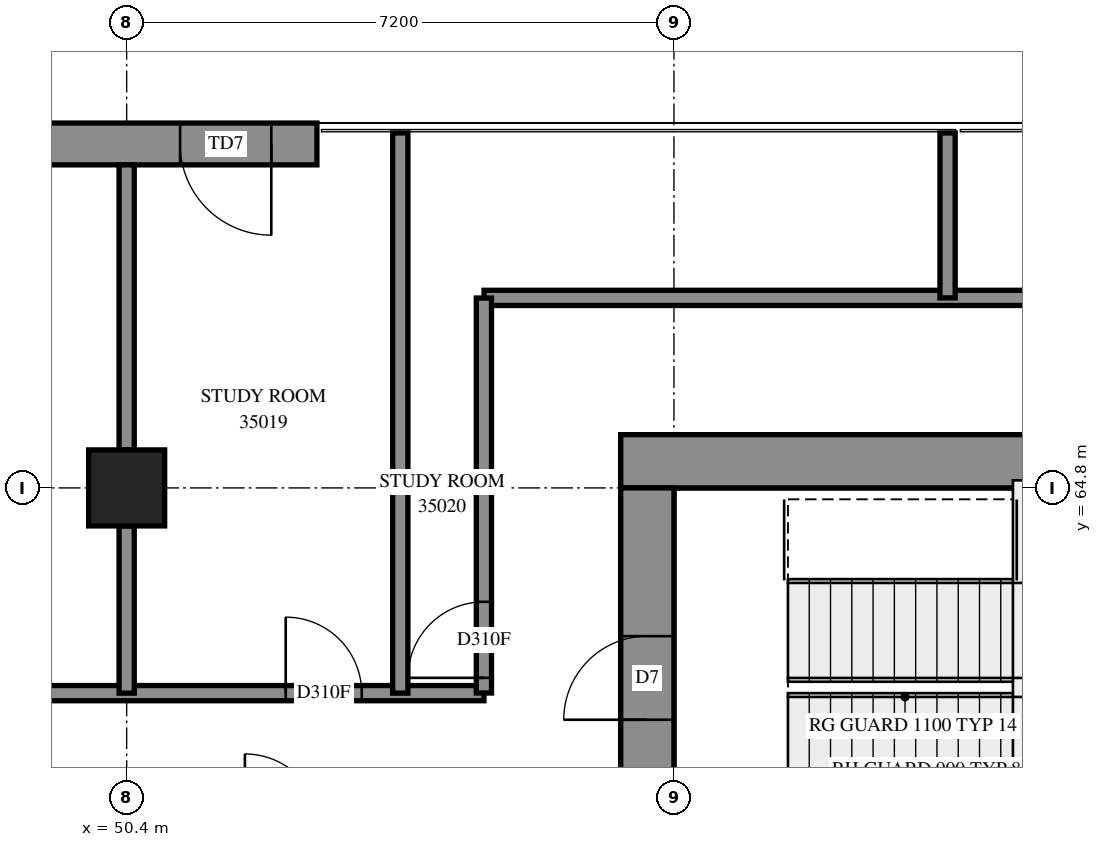
"""IFC4 building model, lengths in metres.
Left out: names, types, materials, properties, quantities, classifications, styles, units other than length and angle.
Written with IfcOpenShell. Run it as: python <this file> out.ifc"""

import sys

from ifc_helpers import new_model, si_unit, direction, frame, frame_2d, origin, origin_2d, place, context, subcontext, project, spatial, rectangle, extrude, element, fill, save


model = new_model("IFC4")
c1 = context("Model", 3, precision=1e-05, world=origin(), true_north=direction((0.0, 1.0)))
c2 = subcontext(c1, "Body", "Model", "MODEL_VIEW")
j1 = project(units=[si_unit("LENGTHUNIT", "METRE"), si_unit("PLANEANGLEUNIT", "RADIAN")], contexts=[c1])
p1 = place(None, origin())
s1 = spatial("IfcSite", under=j1, at=p1, CompositionType="ELEMENT")
p2 = place(p1, origin())
s2 = spatial("IfcBuilding", under=s1, at=p2, CompositionType="ELEMENT")
p3 = place(p2, frame((0.0, 0.0, 131.2)))
s3 = spatial("IfcBuildingStorey", under=s2, at=p3, CompositionType="ELEMENT", Elevation=131.2)
p4 = place(p3, frame((50.4, 64.8, 0.0), z_axis=(0.0, 0.0, 1.0), x_axis=(1.0, 0.0, 0.0)))
e1 = element("IfcColumn", 1, at=p4, inside=s3, PredefinedType="COLUMN", context=c2, shape_type="SweptSolid", body=[
    extrude(rectangle(XDim=1.0, YDim=1.0, at=origin_2d()), origin(), (0.0, 0.0, 1.0), 3.9),
])
p5 = place(p3, frame((56.9, 65.15, -0.3), z_axis=(0.0, 0.0, 1.0), x_axis=(1.0, 0.0, 0.0)))
e2 = element("IfcWall", 2, at=p5, inside=s3, PredefinedType="SHEAR", context=c2, shape_type="SweptSolid", body=[
    extrude(rectangle(XDim=15.8, YDim=0.7, at=frame_2d((7.9, 0.0))), origin(), (0.0, 0.0, 1.0), 3.5),
])
p6 = place(p5, frame((10.7, 0.0, 0.3)))
e3 = element("IfcOpeningElement", 3, at=p6, cuts=e2, PredefinedType="OPENING", context=c2, shape_type="SweptSolid", body=[
    extrude(rectangle(XDim=0.8, YDim=2.1, at=frame_2d((0.4, 1.05))), frame((0.0, 0.36, 0.0), z_axis=(0.0, -1.0, 0.0), x_axis=(1.0, 0.0, 0.0)), (0.0, 0.0, 1.0), 0.72),
])
p7 = place(p3, frame((57.25, 50.4, -0.3), z_axis=(0.0, 0.0, 1.0), x_axis=(0.0, 1.0, 0.0)))
e4 = element("IfcWall", 4, at=p7, inside=s3, PredefinedType="SHEAR", context=c2, shape_type="SweptSolid", body=[
    extrude(rectangle(XDim=14.4, YDim=0.7, at=frame_2d((7.2, 0.0))), origin(), (0.0, 0.0, 1.0), 3.5),
])
p8 = place(p7, frame((4.55, 0.0, 0.3)))
e5 = element("IfcOpeningElement", 5, at=p8, cuts=e4, PredefinedType="OPENING", context=c2, shape_type="SweptSolid", body=[
    extrude(rectangle(XDim=1.1, YDim=2.1, at=frame_2d((0.55, 1.05))), frame((0.0, 0.36, 0.0), z_axis=(0.0, -1.0, 0.0), x_axis=(1.0, 0.0, 0.0)), (0.0, 0.0, 1.0), 0.72),
])
p9 = place(p7, frame((11.35, 0.0, 0.3)))
e6 = element("IfcOpeningElement", 6, at=p9, cuts=e4, PredefinedType="OPENING", context=c2, shape_type="SweptSolid", body=[
    extrude(rectangle(XDim=1.1, YDim=2.1, at=frame_2d((0.55, 1.05))), frame((0.0, 0.36, 0.0), z_axis=(0.0, -1.0, 0.0), x_axis=(1.0, 0.0, 0.0)), (0.0, 0.0, 1.0), 0.72),
])
p10 = place(p3, frame((52.903, 69.325, 0.0), z_axis=(0.0, 0.0, 1.0), x_axis=(-1.0, 0.0, 0.0)))
e7 = element("IfcWall", 7, at=p10, inside=s3, PredefinedType="SOLIDWALL", context=c2, shape_type="SweptSolid", body=[
    extrude(rectangle(XDim=3.6, YDim=0.55, at=frame_2d((1.8, 0.0))), origin(), (0.0, 0.0, 1.0), 3.9),
])
p11 = place(p10, frame((0.6, 0.0, 0.0)))
e8 = element("IfcOpeningElement", 8, at=p11, cuts=e7, PredefinedType="OPENING", context=c2, shape_type="SweptSolid", body=[
    extrude(rectangle(XDim=1.2, YDim=2.4, at=frame_2d((0.6, 1.2))), frame((0.0, 0.285, 0.0), z_axis=(0.0, -1.0, 0.0), x_axis=(1.0, 0.0, 0.0)), (0.0, 0.0, 1.0), 0.57),
])
p12 = place(p3, frame((55.102, 67.3, 0.0), z_axis=(0.0, 0.0, 1.0), x_axis=(1.0, 0.0, 0.0)))
e9 = element("IfcWall", 9, at=p12, inside=s3, PredefinedType="PARTITIONING", context=c2, shape_type="SweptSolid", body=[
    extrude(rectangle(XDim=19.398, YDim=0.2, at=frame_2d((9.699, 0.0))), origin(), (0.0, 0.0, 1.0), 3.9),
])
p13 = place(p12, frame((8.435, 0.0, 0.0)))
e10 = element("IfcOpeningElement", 10, at=p13, cuts=e9, PredefinedType="OPENING", context=c2, shape_type="SweptSolid", body=[
    extrude(rectangle(XDim=1.0, YDim=2.1, at=frame_2d((0.5, 1.05))), frame((0.0, 0.11, 0.0), z_axis=(0.0, -1.0, 0.0), x_axis=(1.0, 0.0, 0.0)), (0.0, 0.0, 1.0), 0.22),
])
p14 = place(p3, frame((40.502, 62.1, 0.0), z_axis=(0.0, 0.0, 1.0), x_axis=(1.0, 0.0, 0.0)))
e11 = element("IfcWall", 11, at=p14, inside=s3, PredefinedType="PARTITIONING", context=c2, shape_type="SweptSolid", body=[
    extrude(rectangle(XDim=14.598, YDim=0.2, at=frame_2d((7.299, 0.0))), origin(), (0.0, 0.0, 1.0), 3.9),
])
p15 = place(p14, frame((0.265, 0.0, 0.0)))
e12 = element("IfcOpeningElement", 12, at=p15, cuts=e11, PredefinedType="OPENING", context=c2, shape_type="SweptSolid", body=[
    extrude(rectangle(XDim=1.0, YDim=2.1, at=frame_2d((0.5, 1.05))), frame((0.0, 0.11, 0.0), z_axis=(0.0, -1.0, 0.0), x_axis=(1.0, 0.0, 0.0)), (0.0, 0.0, 1.0), 0.22),
])
p16 = place(p14, frame((11.991, 0.0, 0.0)))
e13 = element("IfcOpeningElement", 13, at=p16, cuts=e11, PredefinedType="OPENING", context=c2, shape_type="SweptSolid", body=[
    extrude(rectangle(XDim=1.0, YDim=2.1, at=frame_2d((0.5, 1.05))), frame((0.0, 0.11, 0.0), z_axis=(0.0, -1.0, 0.0), x_axis=(1.0, 0.0, 0.0)), (0.0, 0.0, 1.0), 0.22),
])
p17 = place(p3, frame((54.0, 62.1, 0.0), z_axis=(0.0, 0.0, 1.0), x_axis=(0.0, 1.0, 0.0)))
e14 = element("IfcWall", 14, at=p17, inside=s3, PredefinedType="PARTITIONING", context=c2, shape_type="SweptSolid", body=[
    extrude(rectangle(XDim=7.37, YDim=0.2, at=frame_2d((3.685, 0.0))), origin(), (0.0, 0.0, 1.0), 3.9),
])
p18 = place(p3, frame((55.1, 62.102, 0.0), z_axis=(0.0, 0.0, 1.0), x_axis=(0.0, 1.0, 0.0)))
e15 = element("IfcWall", 15, at=p18, inside=s3, PredefinedType="PARTITIONING", context=c2, shape_type="SweptSolid", body=[
    extrude(rectangle(XDim=5.196, YDim=0.2, at=frame_2d((2.598, 0.0))), origin(), (0.0, 0.0, 1.0), 3.9),
])
p19 = place(p18, frame((0.199, 0.0, 0.0)))
e16 = element("IfcOpeningElement", 16, at=p19, cuts=e15, PredefinedType="OPENING", context=c2, shape_type="SweptSolid", body=[
    extrude(rectangle(XDim=1.0, YDim=2.1, at=frame_2d((0.5, 1.05))), frame((0.0, 0.11, 0.0), z_axis=(0.0, -1.0, 0.0), x_axis=(1.0, 0.0, 0.0)), (0.0, 0.0, 1.0), 0.22),
])
p20 = place(p3, frame((50.4, 65.3, 0.0), z_axis=(0.0, 0.0, 1.0), x_axis=(0.0, 1.0, 0.0)))
e17 = element("IfcWall", 17, at=p20, inside=s3, PredefinedType="PARTITIONING", context=c2, shape_type="SweptSolid", body=[
    extrude(rectangle(XDim=3.75, YDim=0.2, at=frame_2d((1.875, 0.0))), origin(), (0.0, 0.0, 1.0), 3.9),
])
p21 = place(p3, frame((50.4, 62.1, 0.0), z_axis=(0.0, 0.0, 1.0), x_axis=(0.0, 1.0, 0.0)))
e18 = element("IfcWall", 18, at=p21, inside=s3, PredefinedType="PARTITIONING", context=c2, shape_type="SweptSolid", body=[
    extrude(rectangle(XDim=2.2, YDim=0.2, at=frame_2d((1.1, 0.0))), origin(), (0.0, 0.0, 1.0), 3.9),
])
p22 = place(p3, frame((61.2, 67.3, 0.0), z_axis=(0.0, 0.0, 1.0), x_axis=(0.0, 1.0, 0.0)))
e19 = element("IfcWall", 19, at=p22, inside=s3, PredefinedType="PARTITIONING", context=c2, shape_type="SweptSolid", body=[
    extrude(rectangle(XDim=2.17, YDim=0.2, at=frame_2d((1.085, 0.0))), origin(), (0.0, 0.0, 1.0), 3.9),
])
p23 = place(p11, origin())
e20 = element("IfcDoor", 20, at=p23, inside=s3, OperationType="SINGLE_SWING_LEFT", PredefinedType="DOOR", context=c2, shape_type="SweptSolid", body=[
    extrude(rectangle(XDim=1.2, YDim=2.4, at=frame_2d((0.6, 1.2))), frame((0.0, 0.025, 0.0), z_axis=(0.0, -1.0, 0.0), x_axis=(1.0, 0.0, 0.0)), (0.0, 0.0, 1.0), 0.05),
])
fill(e8, e20)
p24 = place(p9, origin())
e21 = element("IfcDoor", 21, at=p24, inside=s3, OperationType="SINGLE_SWING_LEFT", PredefinedType="DOOR", context=c2, shape_type="SweptSolid", body=[
    extrude(rectangle(XDim=1.1, YDim=2.1, at=frame_2d((0.55, 1.05))), frame((0.0, 0.025, 0.0), z_axis=(0.0, -1.0, 0.0), x_axis=(1.0, 0.0, 0.0)), (0.0, 0.0, 1.0), 0.05),
])
fill(e6, e21)
p25 = place(p16, origin())
e22 = element("IfcDoor", 22, at=p25, inside=s3, OperationType="SINGLE_SWING_RIGHT", PredefinedType="DOOR", context=c2, shape_type="SweptSolid", body=[
    extrude(rectangle(XDim=1.0, YDim=2.1, at=frame_2d((0.5, 1.05))), frame((0.0, 0.025, 0.0), z_axis=(0.0, -1.0, 0.0), x_axis=(1.0, 0.0, 0.0)), (0.0, 0.0, 1.0), 0.05),
])
fill(e13, e22)
p26 = place(p19, origin())
e23 = element("IfcDoor", 23, at=p26, inside=s3, OperationType="SINGLE_SWING_LEFT", PredefinedType="DOOR", context=c2, shape_type="SweptSolid", body=[
    extrude(rectangle(XDim=1.0, YDim=2.1, at=frame_2d((0.5, 1.05))), frame((0.0, 0.025, 0.0), z_axis=(0.0, -1.0, 0.0), x_axis=(1.0, 0.0, 0.0)), (0.0, 0.0, 1.0), 0.05),
])
fill(e16, e23)
save(model, sys.argv[1])
